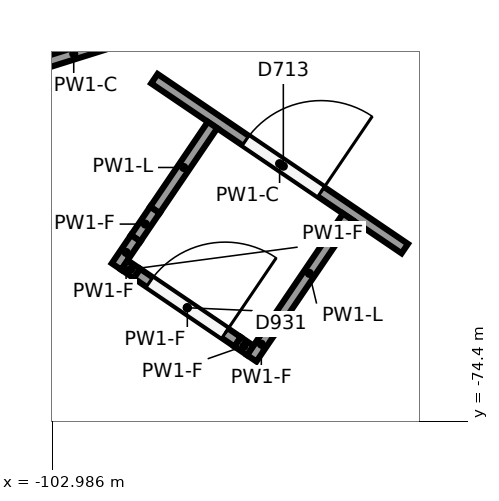
"""IFC4 building model, lengths in metres.
Left out: names, types, materials, properties, quantities, classifications, styles, units other than length and angle.
Written with IfcOpenShell. Run it as: python <this file> out.ifc"""

import sys

from ifc_helpers import new_model, si_unit, direction, frame, frame_2d, origin, origin_2d, place, context, subcontext, project, spatial, rectangle, circle, extrude, element, fill, save


model = new_model("IFC4")
c1 = context("Model", 3, precision=1e-05, world=origin(), true_north=direction((0.0, 1.0)))
c2 = subcontext(c1, "Body", "Model", "MODEL_VIEW")
j1 = project(units=[si_unit("LENGTHUNIT", "METRE"), si_unit("PLANEANGLEUNIT", "RADIAN")], contexts=[c1])
p1 = place(None, origin())
s1 = spatial("IfcSite", under=j1, at=p1, CompositionType="ELEMENT")
p2 = place(p1, origin())
s2 = spatial("IfcBuilding", under=s1, at=p2, CompositionType="ELEMENT")
p3 = place(p2, frame((0.0, 0.0, 12.0)))
s3 = spatial("IfcBuildingStorey", under=s2, at=p3, CompositionType="ELEMENT", Elevation=12.0)
p4 = place(p3, frame((-101.14, -69.294, 0.0), z_axis=(0.0, 0.0, 1.0), x_axis=(1.0, 0.0, 0.0)))
e1 = element("IfcColumn", 1, at=p4, inside=s3, PredefinedType="COLUMN", context=c2, shape_type="SweptSolid", body=[
    extrude(circle(Radius=0.4, at=origin_2d()), origin(), (0.0, 0.0, 1.0), 6.0),
])
p5 = place(p3, frame((-102.051, -69.36, 0.0), z_axis=(0.0, 0.0, 1.0), x_axis=(-0.954243765566, -0.299029824395, 0.0)))
e2 = element("IfcWall", 2, at=p5, inside=s3, PredefinedType="PARTITIONING", context=c2, shape_type="SweptSolid", body=[
    extrude(rectangle(XDim=1.363, YDim=0.15, at=frame_2d((0.681, 0.0))), origin(), (0.0, 0.0, 1.0), 5.55),
])
p6 = place(p3, frame((-101.639, -69.893, 0.0), z_axis=(0.0, 0.0, 1.0), x_axis=(0.82747475675, -0.561502918017, 0.0)))
e3 = element("IfcWall", 3, at=p6, inside=s3, PredefinedType="PARTITIONING", context=c2, shape_type="SweptSolid", body=[
    extrude(rectangle(XDim=3.981, YDim=0.15, at=frame_2d((1.99, 0.0))), origin(), (0.0, 0.0, 1.0), 5.55),
])
p7 = place(p6, frame((1.45, 0.0, 0.0)))
e4 = element("IfcOpeningElement", 4, at=p7, cuts=e3, PredefinedType="OPENING", context=c2, shape_type="SweptSolid", body=[
    extrude(rectangle(XDim=1.2, YDim=2.1, at=frame_2d((0.6, 1.05))), frame((0.0, 0.085, 0.0), z_axis=(0.0, -1.0, 0.0), x_axis=(1.0, 0.0, 0.0)), (0.0, 0.0, 1.0), 0.17),
])
p8 = place(p3, frame((-100.875, -70.502, 0.0), z_axis=(0.0, 0.0, 1.0), x_axis=(-0.561567757892, -0.827430754382, 0.0)))
e5 = element("IfcWall", 5, at=p8, inside=s3, PredefinedType="PARTITIONING", context=c2, shape_type="SweptSolid", body=[
    extrude(rectangle(XDim=1.35, YDim=0.15, at=frame_2d((0.675, 0.0))), origin(), (0.0, 0.0, 1.0), 5.6),
])
p9 = place(p3, frame((-101.633, -71.619, 0.0), z_axis=(0.0, 0.0, 1.0), x_axis=(-0.561315731762, -0.827601745574, 0.0)))
e6 = element("IfcWall", 6, at=p9, inside=s3, PredefinedType="PARTITIONING", context=c2, shape_type="SweptSolid", body=[
    extrude(rectangle(XDim=0.45, YDim=0.15, at=frame_2d((0.225, 0.0))), origin(), (0.0, 0.0, 1.0), 4.3),
])
p10 = place(p3, frame((-101.885, -71.992, 0.0), z_axis=(0.0, 0.0, 1.0), x_axis=(-0.561567757892, -0.827430754382, 0.0)))
e7 = element("IfcWall", 7, at=p10, inside=s3, PredefinedType="PARTITIONING", context=c2, shape_type="SweptSolid", body=[
    extrude(rectangle(XDim=0.45, YDim=0.15, at=frame_2d((0.225, 0.0))), origin(), (0.0, 0.0, 1.0), 4.3),
])
p11 = place(p3, frame((-99.096, -71.709, 0.0), z_axis=(0.0, 0.0, 1.0), x_axis=(-0.561504735028, -0.82747352377, 0.0)))
e8 = element("IfcWall", 8, at=p11, inside=s3, PredefinedType="PARTITIONING", context=c2, shape_type="SweptSolid", body=[
    extrude(rectangle(XDim=1.8, YDim=0.15, at=frame_2d((0.9, 0.0))), origin(), (0.0, 0.0, 1.0), 5.6),
])
p12 = place(p3, frame((-100.106, -73.199, 0.0), z_axis=(0.0, 0.0, 1.0), x_axis=(-0.561315731762, -0.827601745574, 0.0)))
e9 = element("IfcWall", 9, at=p12, inside=s3, PredefinedType="PARTITIONING", context=c2, shape_type="SweptSolid", body=[
    extrude(rectangle(XDim=0.45, YDim=0.15, at=frame_2d((0.225, 0.0))), origin(), (0.0, 0.0, 1.0), 4.3),
])
p13 = place(p3, frame((-102.034, -72.344, 0.0), z_axis=(0.0, 0.0, 1.0), x_axis=(0.827516278761, -0.561441723053, 0.0)))
e10 = element("IfcWall", 10, at=p13, inside=s3, PredefinedType="PARTITIONING", context=c2, shape_type="SweptSolid", body=[
    extrude(rectangle(XDim=0.2, YDim=0.15, at=frame_2d((0.1, 0.0))), origin(), (0.0, 0.0, 1.0), 4.3),
])
p14 = place(p3, frame((-101.868, -72.456, 0.0), z_axis=(0.0, 0.0, 1.0), x_axis=(0.827468178384, -0.561512612291, 0.0)))
e11 = element("IfcWall", 11, at=p14, inside=s3, PredefinedType="PARTITIONING", context=c2, shape_type="SweptSolid", body=[
    extrude(rectangle(XDim=1.6, YDim=0.15, at=frame_2d((0.8, 0.0))), origin(), (0.0, 0.0, 1.0), 4.3),
])
p15 = place(p14, frame((0.2, 0.0, 0.0)))
e12 = element("IfcOpeningElement", 12, at=p15, cuts=e11, PredefinedType="OPENING", context=c2, shape_type="SweptSolid", body=[
    extrude(rectangle(XDim=1.2, YDim=2.1, at=frame_2d((0.6, 1.05))), frame((0.0, 0.085, 0.0), z_axis=(0.0, -1.0, 0.0), x_axis=(1.0, 0.0, 0.0)), (0.0, 0.0, 1.0), 0.17),
])
p16 = place(p3, frame((-100.544, -73.355, 0.0), z_axis=(0.0, 0.0, 1.0), x_axis=(0.827516278761, -0.561441723053, 0.0)))
e13 = element("IfcWall", 13, at=p16, inside=s3, PredefinedType="PARTITIONING", context=c2, shape_type="SweptSolid", body=[
    extrude(rectangle(XDim=0.2, YDim=0.15, at=frame_2d((0.1, 0.0))), origin(), (0.0, 0.0, 1.0), 4.3),
])
p17 = place(p7, origin())
e14 = element("IfcDoor", 14, at=p17, inside=s3, OperationType="SINGLE_SWING_RIGHT", PredefinedType="DOOR", context=c2, shape_type="SweptSolid", body=[
    extrude(rectangle(XDim=1.2, YDim=2.1, at=frame_2d((0.6, 1.05))), frame((0.0, 0.025, 0.0), z_axis=(0.0, -1.0, 0.0), x_axis=(1.0, 0.0, 0.0)), (0.0, 0.0, 1.0), 0.05),
])
fill(e4, e14)
p18 = place(p15, origin())
e15 = element("IfcDoor", 15, at=p18, inside=s3, OperationType="SINGLE_SWING_RIGHT", PredefinedType="DOOR", context=c2, shape_type="SweptSolid", body=[
    extrude(rectangle(XDim=1.2, YDim=2.1, at=frame_2d((0.6, 1.05))), frame((0.0, 0.025, 0.0), z_axis=(0.0, -1.0, 0.0), x_axis=(1.0, 0.0, 0.0)), (0.0, 0.0, 1.0), 0.05),
])
fill(e12, e15)
save(model, sys.argv[1])
